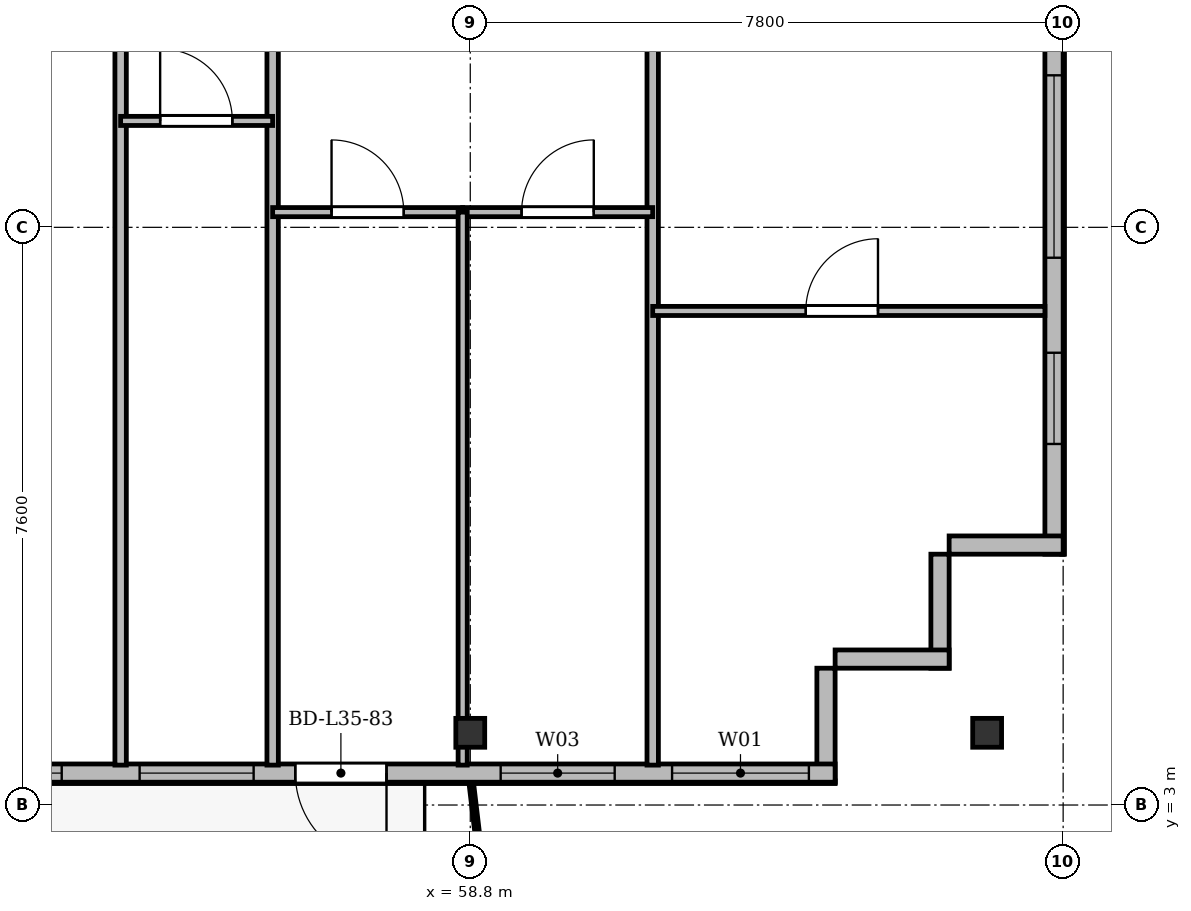
"""IFC4 building model, lengths in metres.
Left out: names, types, materials, properties, quantities, classifications, styles, units other than length and angle.
Written with IfcOpenShell. Run it as: python <this file> out.ifc"""

import sys

from ifc_helpers import new_model, si_unit, direction, frame, frame_2d, origin, origin_2d, place, context, subcontext, project, spatial, rectangle, i_section, extrude, source, transform, mapped, element, fill, save


model = new_model("IFC4")
c1 = context("Model", 3, precision=1e-05, world=origin(), true_north=direction((0.0, 1.0)))
c2 = subcontext(c1, "Body", "Model", "MODEL_VIEW")
j1 = project(units=[si_unit("LENGTHUNIT", "METRE"), si_unit("PLANEANGLEUNIT", "RADIAN")], contexts=[c1])
p1 = place(None, origin())
s1 = spatial("IfcSite", under=j1, at=p1, CompositionType="ELEMENT")
p2 = place(p1, origin())
s2 = spatial("IfcBuilding", under=s1, at=p2, CompositionType="ELEMENT")
p3 = place(p2, frame((0.0, 0.0, 135.7)))
s3 = spatial("IfcBuildingStorey", under=s2, at=p3, CompositionType="ELEMENT", Elevation=135.7)
m1 = source(origin(), c2, "Body", "SweptSolid", [
    extrude(i_section(OverallWidth=0.38, OverallDepth=0.38, WebThickness=0.02, FlangeThickness=0.03, at=origin_2d()), origin(), (0.0, 0.0, 1.0), 3.6),
])
for number, where, z_axis, x_axis in (
    (1, (58.8, 3.95, 0.0), (0.0, 0.0, 1.0), (1.0, 0.0, 0.0)),
    (2, (65.6, 3.95, 0.0), (0.0, 0.0, 1.0), (1.0, 0.0, 0.0)),
):
    element("IfcColumn", number, at=place(p3, frame(where, z_axis=z_axis, x_axis=x_axis)), inside=s3, PredefinedType="COLUMN", context=c2, shape_type="MappedRepresentation", body=[
        mapped(m1, transform((0.0, 0.0, 0.0), x_axis=(1.0, 0.0, 0.0), y_axis=(0.0, 1.0, 0.0), z_axis=(0.0, 0.0, 1.0), scale=1.0)),
    ])
p4 = place(p3, frame((66.48, 45.5, 0.0), z_axis=(0.0, 0.0, 1.0), x_axis=(0.0, -1.0, 0.0)))
e3 = element("IfcWall", 3, at=p4, inside=s3, PredefinedType="SOLIDWALL", context=c2, shape_type="SweptSolid", body=[
    extrude(rectangle(XDim=39.2, YDim=0.24, at=frame_2d((19.6, 0.0))), origin(), (0.0, 0.0, 1.0), 3.35),
])
p5 = place(p4, frame((36.55, 0.0, 0.92)))
e4 = element("IfcOpeningElement", 4, at=p5, cuts=e3, PredefinedType="OPENING", context=c2, shape_type="SweptSolid", body=[
    extrude(rectangle(XDim=1.2, YDim=1.65, at=frame_2d((0.6, 0.825))), frame((0.0, 0.13, 0.0), z_axis=(0.0, -1.0, 0.0), x_axis=(1.0, 0.0, 0.0)), (0.0, 0.0, 1.0), 0.26),
])
p6 = place(p4, frame((32.9, 0.0, 0.92)))
e5 = element("IfcOpeningElement", 5, at=p6, cuts=e3, PredefinedType="OPENING", context=c2, shape_type="SweptSolid", body=[
    extrude(rectangle(XDim=2.4, YDim=2.1, at=frame_2d((1.2, 1.05))), frame((0.0, 0.13, 0.0), z_axis=(0.0, -1.0, 0.0), x_axis=(1.0, 0.0, 0.0)), (0.0, 0.0, 1.0), 0.26),
])
p7 = place(p4, frame((28.7, 0.0, 0.92)))
e6 = element("IfcOpeningElement", 6, at=p7, cuts=e3, PredefinedType="OPENING", context=c2, shape_type="SweptSolid", body=[
    extrude(rectangle(XDim=2.4, YDim=2.1, at=frame_2d((1.2, 1.05))), frame((0.0, 0.13, 0.0), z_axis=(0.0, -1.0, 0.0), x_axis=(1.0, 0.0, 0.0)), (0.0, 0.0, 1.0), 0.26),
])
p8 = place(p4, frame((21.5, 0.0, 0.92)))
e7 = element("IfcOpeningElement", 7, at=p8, cuts=e3, PredefinedType="OPENING", context=c2, shape_type="SweptSolid", body=[
    extrude(rectangle(XDim=2.4, YDim=2.1, at=frame_2d((1.2, 1.05))), frame((0.0, 0.13, 0.0), z_axis=(0.0, -1.0, 0.0), x_axis=(1.0, 0.0, 0.0)), (0.0, 0.0, 1.0), 0.26),
])
p9 = place(p4, frame((7.5, 0.0, 0.92)))
e8 = element("IfcOpeningElement", 8, at=p9, cuts=e3, PredefinedType="OPENING", context=c2, shape_type="SweptSolid", body=[
    extrude(rectangle(XDim=2.4, YDim=2.1, at=frame_2d((1.2, 1.05))), frame((0.0, 0.13, 0.0), z_axis=(0.0, -1.0, 0.0), x_axis=(1.0, 0.0, 0.0)), (0.0, 0.0, 1.0), 0.26),
])
p10 = place(p4, frame((4.5, 0.0, 0.92)))
e9 = element("IfcOpeningElement", 9, at=p10, cuts=e3, PredefinedType="OPENING", context=c2, shape_type="SweptSolid", body=[
    extrude(rectangle(XDim=1.2, YDim=1.65, at=frame_2d((0.6, 0.825))), frame((0.0, 0.13, 0.0), z_axis=(0.0, -1.0, 0.0), x_axis=(1.0, 0.0, 0.0)), (0.0, 0.0, 1.0), 0.26),
])
p11 = place(p4, frame((1.15, 0.0, 0.92)))
e10 = element("IfcOpeningElement", 10, at=p11, cuts=e3, PredefinedType="OPENING", context=c2, shape_type="SweptSolid", body=[
    extrude(rectangle(XDim=1.2, YDim=1.65, at=frame_2d((0.6, 0.825))), frame((0.0, 0.13, 0.0), z_axis=(0.0, -1.0, 0.0), x_axis=(1.0, 0.0, 0.0)), (0.0, 0.0, 1.0), 0.26),
])
p12 = place(p3, frame((66.6, 6.42, 0.0), z_axis=(0.0, 0.0, 1.0), x_axis=(-1.0, 0.0, 0.0)))
e11 = element("IfcWall", 11, at=p12, inside=s3, PredefinedType="SOLIDWALL", context=c2, shape_type="SweptSolid", body=[
    extrude(rectangle(XDim=1.5, YDim=0.24, at=frame_2d((0.75, 0.0))), origin(), (0.0, 0.0, 1.0), 2.85),
])
for number, where, z_axis, x_axis in (
    (12, (64.98, 6.3, 0.0), (0.0, 0.0, 1.0), (0.0, -1.0, 0.0)),
    (13, (65.1, 4.92, 0.0), (0.0, 0.0, 1.0), (-1.0, 0.0, 0.0)),
):
    element("IfcWall", number, at=place(p3, frame(where, z_axis=z_axis, x_axis=x_axis)), inside=s3, PredefinedType="SOLIDWALL", context=c2, shape_type="SweptSolid", body=[
        extrude(rectangle(XDim=1.5, YDim=0.24, at=frame_2d((0.75, 0.0))), origin(), (0.0, 0.0, 1.0), 3.35),
    ])
p13 = place(p3, frame((63.48, 4.8, 0.0), z_axis=(0.0, 0.0, 1.0), x_axis=(0.0, -1.0, 0.0)))
e14 = element("IfcWall", 14, at=p13, inside=s3, PredefinedType="SOLIDWALL", context=c2, shape_type="SweptSolid", body=[
    extrude(rectangle(XDim=1.5, YDim=0.24, at=frame_2d((0.75, 0.0))), origin(), (0.0, 0.0, 1.0), 2.75),
])
p14 = place(p3, frame((63.6, 3.42, 0.0), z_axis=(0.0, 0.0, 1.0), x_axis=(-1.0, 0.0, 0.0)))
e15 = element("IfcWall", 15, at=p14, inside=s3, PredefinedType="SOLIDWALL", context=c2, shape_type="SweptSolid", body=[
    extrude(rectangle(XDim=52.8, YDim=0.24, at=frame_2d((26.4, 0.0))), origin(), (0.0, 0.0, 1.0), 3.35),
])
p15 = place(p14, frame((0.345, 0.0, 0.9)))
e16 = element("IfcOpeningElement", 16, at=p15, cuts=e15, PredefinedType="OPENING", context=c2, shape_type="SweptSolid", body=[
    extrude(rectangle(XDim=1.8, YDim=1.8, at=frame_2d((0.9, 0.9))), frame((0.0, 0.13, 0.0), z_axis=(0.0, -1.0, 0.0), x_axis=(1.0, 0.0, 0.0)), (0.0, 0.0, 1.0), 0.26),
])
p16 = place(p14, frame((2.9, 0.0, 0.9)))
e17 = element("IfcOpeningElement", 17, at=p16, cuts=e15, PredefinedType="OPENING", context=c2, shape_type="SweptSolid", body=[
    extrude(rectangle(XDim=1.5, YDim=1.75, at=frame_2d((0.75, 0.875))), frame((0.0, 0.13, 0.0), z_axis=(0.0, -1.0, 0.0), x_axis=(1.0, 0.0, 0.0)), (0.0, 0.0, 1.0), 0.26),
])
p17 = place(p14, frame((5.902, 0.0, 0.0)))
e18 = element("IfcOpeningElement", 18, at=p17, cuts=e15, PredefinedType="OPENING", context=c2, shape_type="SweptSolid", body=[
    extrude(rectangle(XDim=1.2, YDim=2.2, at=frame_2d((0.6, 1.1))), frame((0.0, 0.13, 0.0), z_axis=(0.0, -1.0, 0.0), x_axis=(1.0, 0.0, 0.0)), (0.0, 0.0, 1.0), 0.26),
])
p18 = place(p14, frame((7.65, 0.0, 0.9)))
e19 = element("IfcOpeningElement", 19, at=p18, cuts=e15, PredefinedType="OPENING", context=c2, shape_type="SweptSolid", body=[
    extrude(rectangle(XDim=1.5, YDim=1.75, at=frame_2d((0.75, 0.875))), frame((0.0, 0.13, 0.0), z_axis=(0.0, -1.0, 0.0), x_axis=(1.0, 0.0, 0.0)), (0.0, 0.0, 1.0), 0.26),
])
p19 = place(p14, frame((10.175, 0.0, 0.9)))
e20 = element("IfcOpeningElement", 20, at=p19, cuts=e15, PredefinedType="OPENING", context=c2, shape_type="SweptSolid", body=[
    extrude(rectangle(XDim=1.65, YDim=1.85, at=frame_2d((0.825, 0.925))), frame((0.0, 0.13, 0.0), z_axis=(0.0, -1.0, 0.0), x_axis=(1.0, 0.0, 0.0)), (0.0, 0.0, 1.0), 0.26),
])
p20 = place(p14, frame((12.9, 0.0, 0.9)))
e21 = element("IfcOpeningElement", 21, at=p20, cuts=e15, PredefinedType="OPENING", context=c2, shape_type="SweptSolid", body=[
    extrude(rectangle(XDim=1.8, YDim=1.8, at=frame_2d((0.9, 0.9))), frame((0.0, 0.13, 0.0), z_axis=(0.0, -1.0, 0.0), x_axis=(1.0, 0.0, 0.0)), (0.0, 0.0, 1.0), 0.26),
])
p21 = place(p14, frame((15.45, 0.0, 0.9)))
e22 = element("IfcOpeningElement", 22, at=p21, cuts=e15, PredefinedType="OPENING", context=c2, shape_type="SweptSolid", body=[
    extrude(rectangle(XDim=1.5, YDim=1.75, at=frame_2d((0.75, 0.875))), frame((0.0, 0.13, 0.0), z_axis=(0.0, -1.0, 0.0), x_axis=(1.0, 0.0, 0.0)), (0.0, 0.0, 1.0), 0.26),
])
p22 = place(p14, frame((17.85, 0.0, 0.9)))
e23 = element("IfcOpeningElement", 23, at=p22, cuts=e15, PredefinedType="OPENING", context=c2, shape_type="SweptSolid", body=[
    extrude(rectangle(XDim=1.5, YDim=1.75, at=frame_2d((0.75, 0.875))), frame((0.0, 0.13, 0.0), z_axis=(0.0, -1.0, 0.0), x_axis=(1.0, 0.0, 0.0)), (0.0, 0.0, 1.0), 0.26),
])
p23 = place(p14, frame((20.45, 0.0, 0.9)))
e24 = element("IfcOpeningElement", 24, at=p23, cuts=e15, PredefinedType="OPENING", context=c2, shape_type="SweptSolid", body=[
    extrude(rectangle(XDim=2.0, YDim=1.95, at=frame_2d((1.0, 0.975))), frame((0.0, 0.13, 0.0), z_axis=(0.0, -1.0, 0.0), x_axis=(1.0, 0.0, 0.0)), (0.0, 0.0, 1.0), 0.26),
])
p24 = place(p14, frame((23.925, 0.0, 0.9)))
e25 = element("IfcOpeningElement", 25, at=p24, cuts=e15, PredefinedType="OPENING", context=c2, shape_type="SweptSolid", body=[
    extrude(rectangle(XDim=1.65, YDim=1.85, at=frame_2d((0.825, 0.925))), frame((0.0, 0.13, 0.0), z_axis=(0.0, -1.0, 0.0), x_axis=(1.0, 0.0, 0.0)), (0.0, 0.0, 1.0), 0.26),
])
p25 = place(p14, frame((28.8, 0.0, 0.9)))
e26 = element("IfcOpeningElement", 26, at=p25, cuts=e15, PredefinedType="OPENING", context=c2, shape_type="SweptSolid", body=[
    extrude(rectangle(XDim=1.8, YDim=1.8, at=frame_2d((0.9, 0.9))), frame((0.0, 0.13, 0.0), z_axis=(0.0, -1.0, 0.0), x_axis=(1.0, 0.0, 0.0)), (0.0, 0.0, 1.0), 0.26),
])
p26 = place(p14, frame((34.478, 0.0, 0.0)))
e27 = element("IfcOpeningElement", 27, at=p26, cuts=e15, PredefinedType="OPENING", context=c2, shape_type="SweptSolid", body=[
    extrude(rectangle(XDim=1.2, YDim=2.2, at=frame_2d((0.6, 1.1))), frame((0.0, 0.13, 0.0), z_axis=(0.0, -1.0, 0.0), x_axis=(1.0, 0.0, 0.0)), (0.0, 0.0, 1.0), 0.26),
])
p27 = place(p14, frame((37.65, 0.0, 0.9)))
e28 = element("IfcOpeningElement", 28, at=p27, cuts=e15, PredefinedType="OPENING", context=c2, shape_type="SweptSolid", body=[
    extrude(rectangle(XDim=1.5, YDim=1.75, at=frame_2d((0.75, 0.875))), frame((0.0, 0.13, 0.0), z_axis=(0.0, -1.0, 0.0), x_axis=(1.0, 0.0, 0.0)), (0.0, 0.0, 1.0), 0.26),
])
p28 = place(p14, frame((40.8, 0.0, 0.9)))
e29 = element("IfcOpeningElement", 29, at=p28, cuts=e15, PredefinedType="OPENING", context=c2, shape_type="SweptSolid", body=[
    extrude(rectangle(XDim=2.0, YDim=1.95, at=frame_2d((1.0, 0.975))), frame((0.0, 0.13, 0.0), z_axis=(0.0, -1.0, 0.0), x_axis=(1.0, 0.0, 0.0)), (0.0, 0.0, 1.0), 0.26),
])
p29 = place(p14, frame((43.65, 0.0, 0.9)))
e30 = element("IfcOpeningElement", 30, at=p29, cuts=e15, PredefinedType="OPENING", context=c2, shape_type="SweptSolid", body=[
    extrude(rectangle(XDim=1.5, YDim=1.75, at=frame_2d((0.75, 0.875))), frame((0.0, 0.13, 0.0), z_axis=(0.0, -1.0, 0.0), x_axis=(1.0, 0.0, 0.0)), (0.0, 0.0, 1.0), 0.26),
])
p30 = place(p14, frame((45.7, 0.0, 0.9)))
e31 = element("IfcOpeningElement", 31, at=p30, cuts=e15, PredefinedType="OPENING", context=c2, shape_type="SweptSolid", body=[
    extrude(rectangle(XDim=1.8, YDim=1.8, at=frame_2d((0.9, 0.9))), frame((0.0, 0.13, 0.0), z_axis=(0.0, -1.0, 0.0), x_axis=(1.0, 0.0, 0.0)), (0.0, 0.0, 1.0), 0.26),
])
p31 = place(p14, frame((48.25, 0.0, 0.9)))
e32 = element("IfcOpeningElement", 32, at=p31, cuts=e15, PredefinedType="OPENING", context=c2, shape_type="SweptSolid", body=[
    extrude(rectangle(XDim=1.5, YDim=1.75, at=frame_2d((0.75, 0.875))), frame((0.0, 0.13, 0.0), z_axis=(0.0, -1.0, 0.0), x_axis=(1.0, 0.0, 0.0)), (0.0, 0.0, 1.0), 0.26),
])
p32 = place(p14, frame((50.705, 0.0, 0.9)))
e33 = element("IfcOpeningElement", 33, at=p32, cuts=e15, PredefinedType="OPENING", context=c2, shape_type="SweptSolid", body=[
    extrude(rectangle(XDim=1.5, YDim=1.75, at=frame_2d((0.75, 0.875))), frame((0.0, 0.13, 0.0), z_axis=(0.0, -1.0, 0.0), x_axis=(1.0, 0.0, 0.0)), (0.0, 0.0, 1.0), 0.26),
])
for number, where, z_axis, x_axis in (
    (34, (61.2, 3.525, 0.0), (0.0, 0.0, 1.0), (0.0, 1.0, 0.0)),
    (35, (54.2, 3.525, 0.0), (0.0, 0.0, 1.0), (0.0, 1.0, 0.0)),
    (36, (56.2, 3.525, 0.0), (0.0, 0.0, 1.0), (0.0, 1.0, 0.0)),
):
    element("IfcWall", number, at=place(p3, frame(where, z_axis=z_axis, x_axis=x_axis)), inside=s3, PredefinedType="PARTITIONING", context=c2, shape_type="SweptSolid", body=[
        extrude(rectangle(XDim=27.275, YDim=0.15, at=frame_2d((13.638, 0.0))), origin(), (0.0, 0.0, 1.0), 2.75),
    ])
p33 = place(p3, frame((54.2, 12.0, 0.0), z_axis=(0.0, 0.0, 1.0), x_axis=(1.0, 0.0, 0.0)))
e37 = element("IfcWall", 37, at=p33, inside=s3, PredefinedType="PARTITIONING", context=c2, shape_type="SweptSolid", body=[
    extrude(rectangle(XDim=2.0, YDim=0.12, at=frame_2d((1.0, 0.0))), origin(), (0.0, 0.0, 1.0), 3.35),
])
p34 = place(p33, frame((0.52, 0.0, 0.0)))
e38 = element("IfcOpeningElement", 38, at=p34, cuts=e37, PredefinedType="OPENING", context=c2, shape_type="SweptSolid", body=[
    extrude(rectangle(XDim=0.95, YDim=2.15, at=frame_2d((0.475, 1.075))), frame((0.0, 0.07, 0.0), z_axis=(0.0, -1.0, 0.0), x_axis=(1.0, 0.0, 0.0)), (0.0, 0.0, 1.0), 0.14),
])
p35 = place(p3, frame((56.2, 10.8, 0.0), z_axis=(0.0, 0.0, 1.0), x_axis=(1.0, 0.0, 0.0)))
e39 = element("IfcWall", 39, at=p35, inside=s3, PredefinedType="PARTITIONING", context=c2, shape_type="SweptSolid", body=[
    extrude(rectangle(XDim=2.5, YDim=0.12, at=frame_2d((1.25, 0.0))), origin(), (0.0, 0.0, 1.0), 3.0),
])
p36 = place(p35, frame((0.775, 0.0, 0.0)))
e40 = element("IfcOpeningElement", 40, at=p36, cuts=e39, PredefinedType="OPENING", context=c2, shape_type="SweptSolid", body=[
    extrude(rectangle(XDim=0.95, YDim=2.15, at=frame_2d((0.475, 1.075))), frame((0.0, 0.07, 0.0), z_axis=(0.0, -1.0, 0.0), x_axis=(1.0, 0.0, 0.0)), (0.0, 0.0, 1.0), 0.14),
])
p37 = place(p3, frame((58.7, 10.8, 0.0), z_axis=(0.0, 0.0, 1.0), x_axis=(1.0, 0.0, 0.0)))
e41 = element("IfcWall", 41, at=p37, inside=s3, PredefinedType="PARTITIONING", context=c2, shape_type="SweptSolid", body=[
    extrude(rectangle(XDim=2.5, YDim=0.12, at=frame_2d((1.25, 0.0))), origin(), (0.0, 0.0, 1.0), 2.85),
])
p38 = place(p37, frame((0.775, 0.0, 0.0)))
e42 = element("IfcOpeningElement", 42, at=p38, cuts=e41, PredefinedType="OPENING", context=c2, shape_type="SweptSolid", body=[
    extrude(rectangle(XDim=0.95, YDim=2.15, at=frame_2d((0.475, 1.075))), frame((0.0, 0.07, 0.0), z_axis=(0.0, -1.0, 0.0), x_axis=(1.0, 0.0, 0.0)), (0.0, 0.0, 1.0), 0.14),
])
p39 = place(p3, frame((58.7, 3.525, 0.0), z_axis=(0.0, 0.0, 1.0), x_axis=(0.0, 1.0, 0.0)))
e43 = element("IfcWall", 43, at=p39, inside=s3, PredefinedType="PARTITIONING", context=c2, shape_type="SweptSolid", body=[
    extrude(rectangle(XDim=7.275, YDim=0.12, at=frame_2d((3.638, 0.0))), origin(), (0.0, 0.0, 1.0), 2.75),
])
p40 = place(p3, frame((61.2, 9.5, 0.0), z_axis=(0.0, 0.0, 1.0), x_axis=(1.0, 0.0, 0.0)))
e44 = element("IfcWall", 44, at=p40, inside=s3, PredefinedType="PARTITIONING", context=c2, shape_type="SweptSolid", body=[
    extrude(rectangle(XDim=5.16, YDim=0.12, at=frame_2d((2.58, 0.0))), origin(), (0.0, 0.0, 1.0), 2.85),
])
p41 = place(p40, frame((2.014, 0.0, 0.0)))
e45 = element("IfcOpeningElement", 45, at=p41, cuts=e44, PredefinedType="OPENING", context=c2, shape_type="SweptSolid", body=[
    extrude(rectangle(XDim=0.95, YDim=2.15, at=frame_2d((0.475, 1.075))), frame((0.0, 0.07, 0.0), z_axis=(0.0, -1.0, 0.0), x_axis=(1.0, 0.0, 0.0)), (0.0, 0.0, 1.0), 0.14),
])
m2 = source(origin(), c2, "Body", "SweptSolid", [
    extrude(rectangle(XDim=1.2, YDim=1.65, at=frame_2d((0.6, 0.825))), frame((0.0, 0.03, 0.0), z_axis=(0.0, -1.0, 0.0), x_axis=(1.0, 0.0, 0.0)), (0.0, 0.0, 1.0), 0.06),
])
p42 = place(p5, origin())
e46 = element("IfcWindow", 46, at=p42, inside=s3, PartitioningType="SINGLE_PANEL", PredefinedType="WINDOW", context=c2, shape_type="MappedRepresentation", body=[
    mapped(m2, transform((0.0, 0.0, 0.0), x_axis=(1.0, 0.0, 0.0), y_axis=(0.0, 1.0, 0.0), z_axis=(0.0, 0.0, 1.0), scale=1.0)),
])
fill(e4, e46)
m3 = source(origin(), c2, "Body", "SweptSolid", [
    extrude(rectangle(XDim=2.4, YDim=2.1, at=frame_2d((1.2, 1.05))), frame((0.0, 0.03, 0.0), z_axis=(0.0, -1.0, 0.0), x_axis=(1.0, 0.0, 0.0)), (0.0, 0.0, 1.0), 0.06),
])
p43 = place(p6, origin())
e47 = element("IfcWindow", 47, at=p43, inside=s3, PartitioningType="SINGLE_PANEL", PredefinedType="WINDOW", context=c2, shape_type="MappedRepresentation", body=[
    mapped(m3, transform((0.0, 0.0, 0.0), x_axis=(1.0, 0.0, 0.0), y_axis=(0.0, 1.0, 0.0), z_axis=(0.0, 0.0, 1.0), scale=1.0)),
])
fill(e5, e47)
m4 = source(origin(), c2, "Body", "SweptSolid", [
    extrude(rectangle(XDim=1.8, YDim=1.8, at=frame_2d((0.9, 0.9))), frame((0.0, 0.03, 0.0), z_axis=(0.0, -1.0, 0.0), x_axis=(1.0, 0.0, 0.0)), (0.0, 0.0, 1.0), 0.06),
])
p44 = place(p15, origin())
e48 = element("IfcWindow", 48, at=p44, inside=s3, PartitioningType="SINGLE_PANEL", PredefinedType="WINDOW", context=c2, shape_type="MappedRepresentation", body=[
    mapped(m4, transform((0.0, 0.0, 0.0), x_axis=(1.0, 0.0, 0.0), y_axis=(0.0, 1.0, 0.0), z_axis=(0.0, 0.0, 1.0), scale=1.0)),
])
fill(e16, e48)
m5 = source(origin(), c2, "Body", "SweptSolid", [
    extrude(rectangle(XDim=1.5, YDim=1.75, at=frame_2d((0.75, 0.875))), frame((0.0, 0.03, 0.0), z_axis=(0.0, -1.0, 0.0), x_axis=(1.0, 0.0, 0.0)), (0.0, 0.0, 1.0), 0.06),
])
p45 = place(p16, origin())
e49 = element("IfcWindow", 49, at=p45, inside=s3, PartitioningType="SINGLE_PANEL", PredefinedType="WINDOW", context=c2, shape_type="MappedRepresentation", body=[
    mapped(m5, transform((0.0, 0.0, 0.0), x_axis=(1.0, 0.0, 0.0), y_axis=(0.0, 1.0, 0.0), z_axis=(0.0, 0.0, 1.0), scale=1.0)),
])
fill(e17, e49)
m6 = source(origin(), c2, "Body", "SweptSolid", [
    extrude(rectangle(XDim=1.2, YDim=2.2, at=frame_2d((0.6, 1.1))), frame((0.0, 0.025, 0.0), z_axis=(0.0, -1.0, 0.0), x_axis=(1.0, 0.0, 0.0)), (0.0, 0.0, 1.0), 0.05),
])
p46 = place(p17, origin())
e50 = element("IfcDoor", 50, at=p46, inside=s3, OperationType="SINGLE_SWING_LEFT", PredefinedType="DOOR", context=c2, shape_type="MappedRepresentation", body=[
    mapped(m6, transform((0.0, 0.0, 0.0), x_axis=(1.0, 0.0, 0.0), y_axis=(0.0, 1.0, 0.0), z_axis=(0.0, 0.0, 1.0), scale=1.0)),
])
fill(e18, e50)
p47 = place(p18, origin())
e51 = element("IfcWindow", 51, at=p47, inside=s3, PartitioningType="SINGLE_PANEL", PredefinedType="WINDOW", context=c2, shape_type="MappedRepresentation", body=[
    mapped(m5, transform((0.0, 0.0, 0.0), x_axis=(1.0, 0.0, 0.0), y_axis=(0.0, 1.0, 0.0), z_axis=(0.0, 0.0, 1.0), scale=1.0)),
])
fill(e19, e51)
m7 = source(origin(), c2, "Body", "SweptSolid", [
    extrude(rectangle(XDim=1.65, YDim=1.85, at=frame_2d((0.825, 0.925))), frame((0.0, 0.03, 0.0), z_axis=(0.0, -1.0, 0.0), x_axis=(1.0, 0.0, 0.0)), (0.0, 0.0, 1.0), 0.06),
])
p48 = place(p19, origin())
e52 = element("IfcWindow", 52, at=p48, inside=s3, PartitioningType="SINGLE_PANEL", PredefinedType="WINDOW", context=c2, shape_type="MappedRepresentation", body=[
    mapped(m7, transform((0.0, 0.0, 0.0), x_axis=(1.0, 0.0, 0.0), y_axis=(0.0, 1.0, 0.0), z_axis=(0.0, 0.0, 1.0), scale=1.0)),
])
fill(e20, e52)
m8 = source(origin(), c2, "Body", "SweptSolid", [
    extrude(rectangle(XDim=0.95, YDim=2.15, at=frame_2d((0.475, 1.075))), frame((0.0, 0.025, 0.0), z_axis=(0.0, -1.0, 0.0), x_axis=(1.0, 0.0, 0.0)), (0.0, 0.0, 1.0), 0.05),
])
p49 = place(p34, origin())
e53 = element("IfcDoor", 53, at=p49, inside=s3, OperationType="SINGLE_SWING_LEFT", PredefinedType="DOOR", context=c2, shape_type="MappedRepresentation", body=[
    mapped(m8, transform((0.0, 0.0, 0.0), x_axis=(1.0, 0.0, 0.0), y_axis=(0.0, 1.0, 0.0), z_axis=(0.0, 0.0, 1.0), scale=1.0)),
])
fill(e38, e53)
p50 = place(p36, origin())
e54 = element("IfcDoor", 54, at=p50, inside=s3, OperationType="SINGLE_SWING_LEFT", PredefinedType="DOOR", context=c2, shape_type="MappedRepresentation", body=[
    mapped(m8, transform((0.0, 0.0, 0.0), x_axis=(1.0, 0.0, 0.0), y_axis=(0.0, 1.0, 0.0), z_axis=(0.0, 0.0, 1.0), scale=1.0)),
])
fill(e40, e54)
p51 = place(p38, origin())
e55 = element("IfcDoor", 55, at=p51, inside=s3, OperationType="SINGLE_SWING_RIGHT", PredefinedType="DOOR", context=c2, shape_type="MappedRepresentation", body=[
    mapped(m8, transform((0.0, 0.0, 0.0), x_axis=(1.0, 0.0, 0.0), y_axis=(0.0, 1.0, 0.0), z_axis=(0.0, 0.0, 1.0), scale=1.0)),
])
fill(e42, e55)
p52 = place(p41, origin())
e56 = element("IfcDoor", 56, at=p52, inside=s3, OperationType="SINGLE_SWING_RIGHT", PredefinedType="DOOR", context=c2, shape_type="MappedRepresentation", body=[
    mapped(m8, transform((0.0, 0.0, 0.0), x_axis=(1.0, 0.0, 0.0), y_axis=(0.0, 1.0, 0.0), z_axis=(0.0, 0.0, 1.0), scale=1.0)),
])
fill(e45, e56)
save(model, sys.argv[1])
